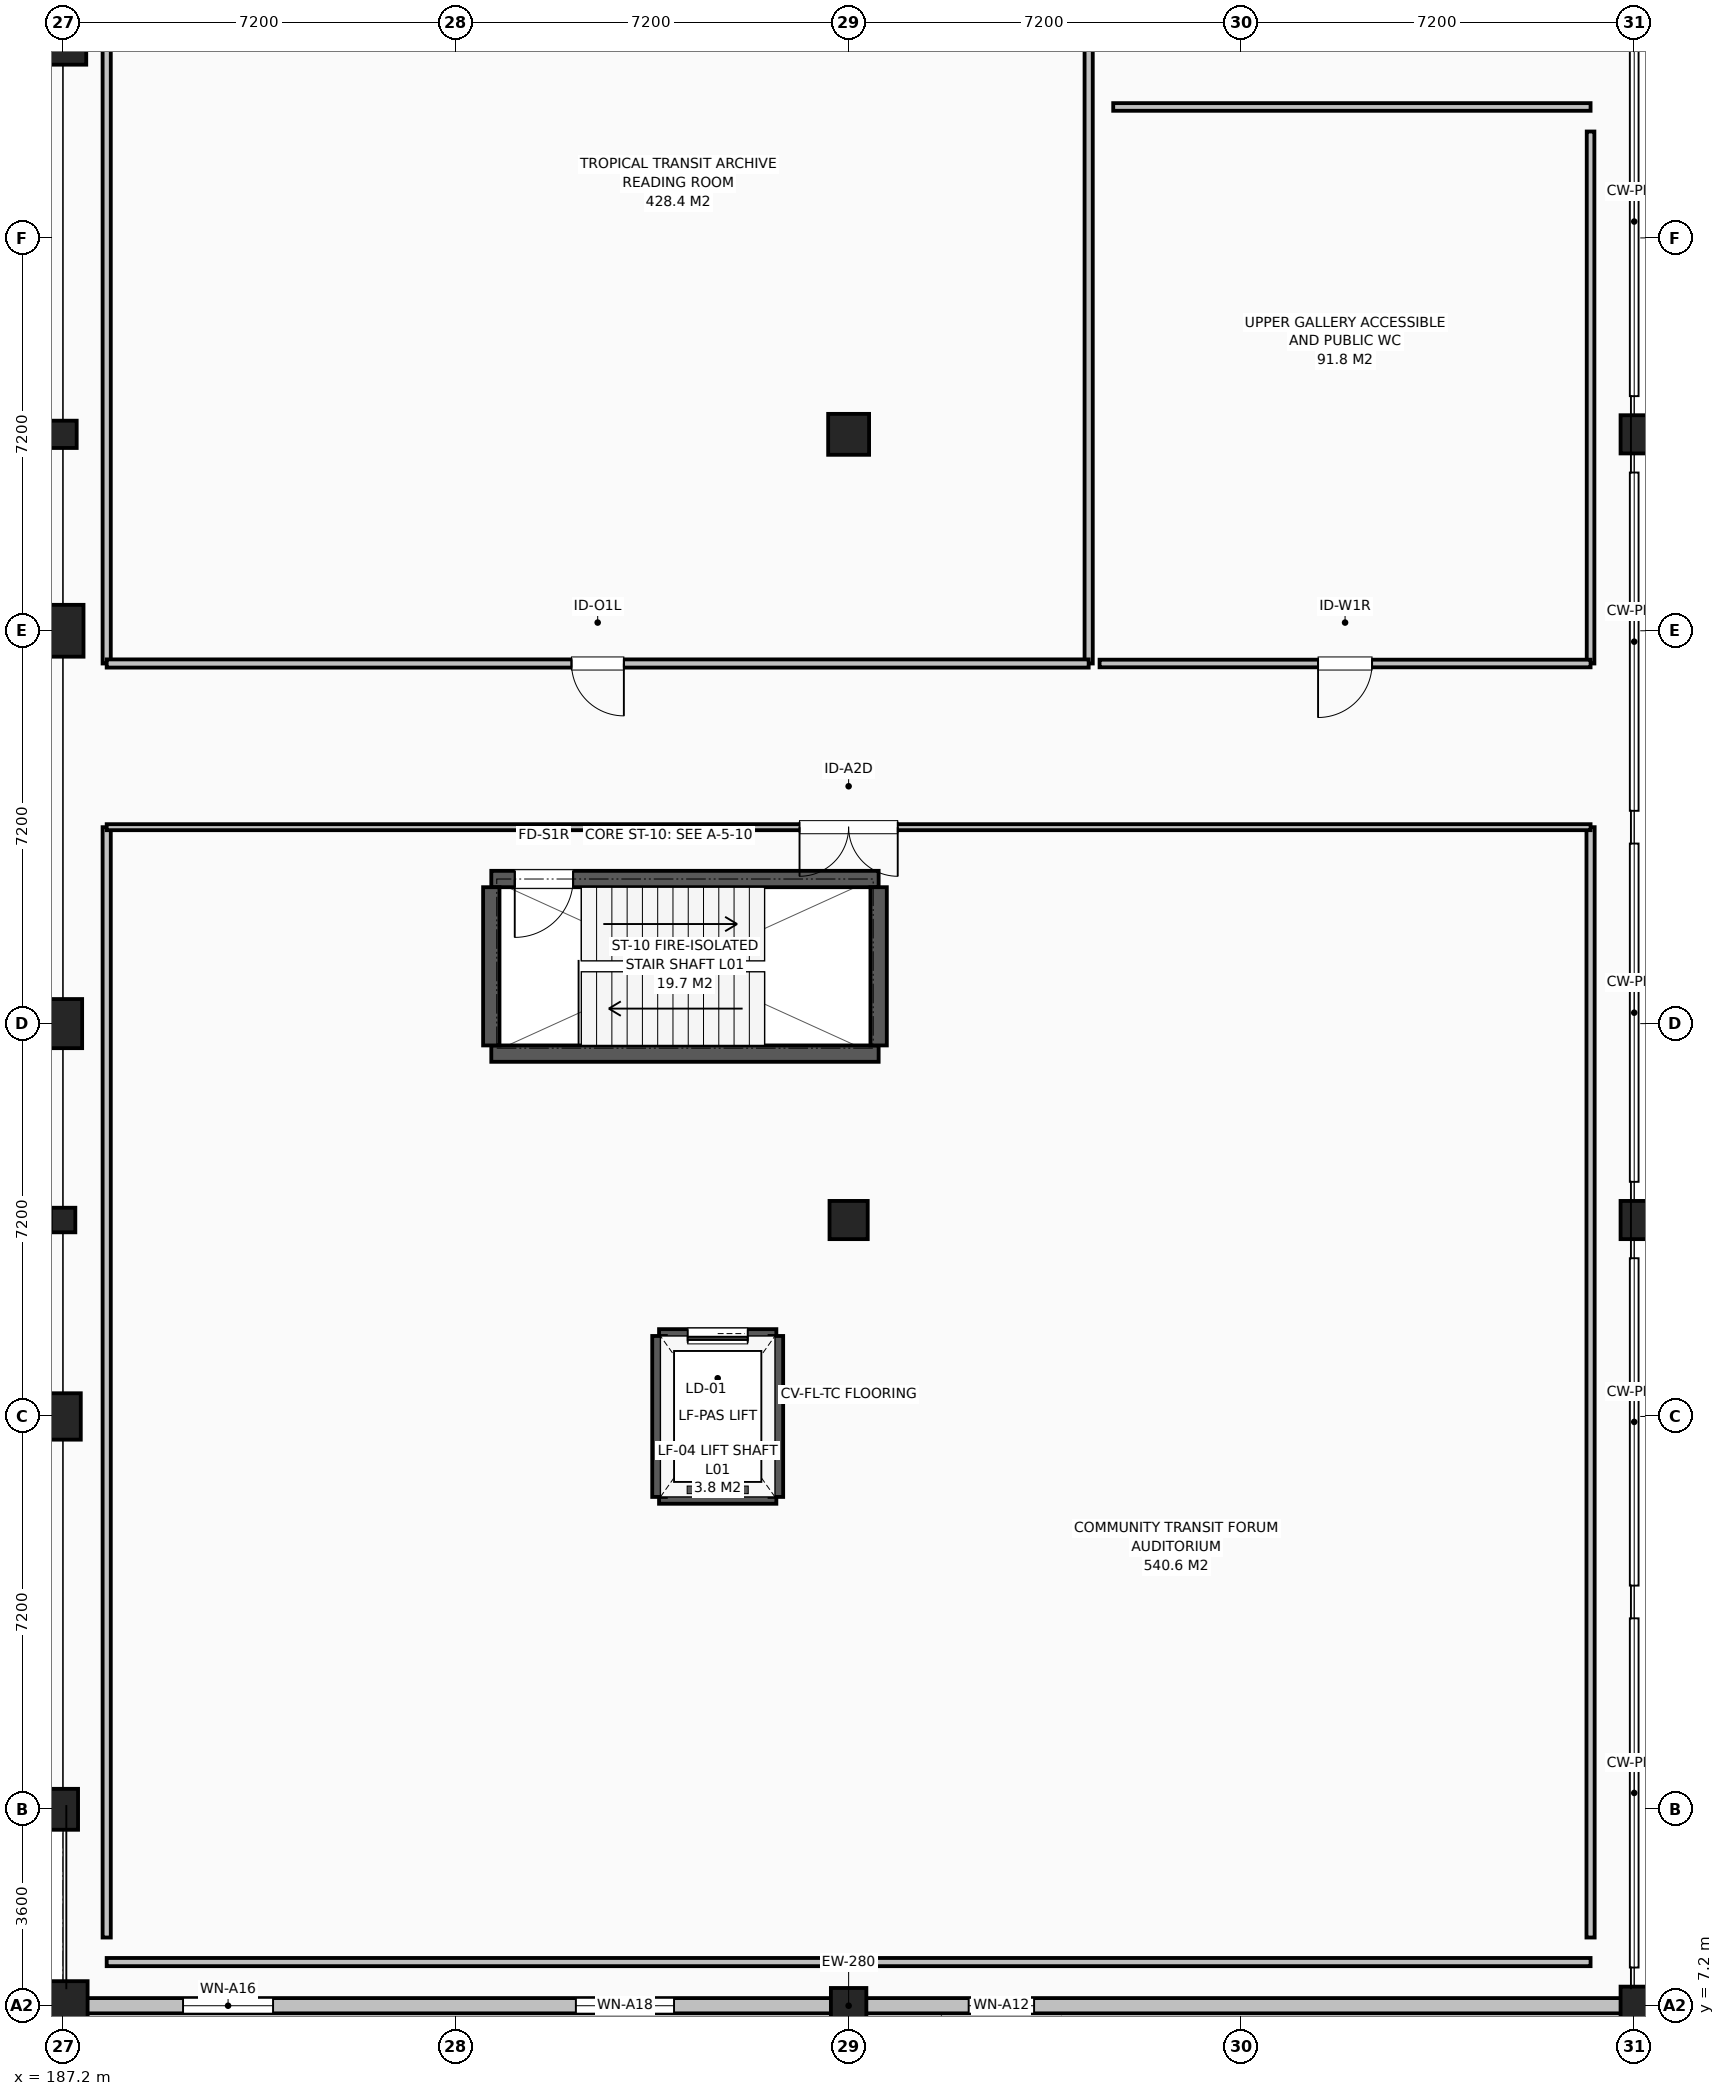
"""IFC4 building model, lengths in metres.
Left out: names, types, materials, properties, quantities, classifications, styles, units other than length and angle.
Written with IfcOpenShell. Run it as: python <this file> out.ifc"""

import sys

from ifc_helpers import new_model, si_unit, direction, frame, frame_2d, origin, origin_2d, place, context, subcontext, project, spatial, rectangle, circle, extrude, element, fill, save


model = new_model("IFC4")
c1 = context("Model", 3, precision=1e-05, world=origin(), true_north=direction((0.0, 1.0)))
c2 = subcontext(c1, "Body", "Model", "MODEL_VIEW")
j1 = project(units=[si_unit("LENGTHUNIT", "METRE"), si_unit("PLANEANGLEUNIT", "RADIAN")], contexts=[c1])
p1 = place(None, origin())
s1 = spatial("IfcSite", under=j1, at=p1, CompositionType="ELEMENT")
p2 = place(p1, origin())
s2 = spatial("IfcBuilding", under=s1, at=p2, CompositionType="ELEMENT")
p3 = place(p2, frame((0.0, 0.0, 4.8)))
s3 = spatial("IfcBuildingStorey", under=s2, at=p3, CompositionType="ELEMENT", Elevation=4.8)
p4 = place(p3, frame((187.2, 7.2, 0.0), z_axis=(0.0, 0.0, 1.0), x_axis=(1.0, 0.0, 0.0)))
e1 = element("IfcColumn", 1, at=p4, inside=s3, PredefinedType="COLUMN", context=c2, shape_type="SweptSolid", body=[
    extrude(circle(Radius=0.45, at=origin_2d()), origin(), (0.0, 0.0, 1.0), 4.2),
])
p5 = place(p3, frame((187.2, 10.8, 0.0), z_axis=(0.0, 0.0, 1.0), x_axis=(1.0, 0.0, 0.0)))
e2 = element("IfcColumn", 2, at=p5, inside=s3, PredefinedType="COLUMN", context=c2, shape_type="SweptSolid", body=[
    extrude(rectangle(XDim=0.55, YDim=0.75, at=origin_2d()), origin(), (0.0, 0.0, 1.0), 4.2),
])
p6 = place(p3, frame((187.2, 18.0, 0.0), z_axis=(0.0, 0.0, 1.0), x_axis=(1.0, 0.0, 0.0)))
e3 = element("IfcColumn", 3, at=p6, inside=s3, PredefinedType="COLUMN", context=c2, shape_type="SweptSolid", body=[
    extrude(rectangle(XDim=0.65, YDim=0.85, at=origin_2d()), origin(), (0.0, 0.0, 1.0), 4.2),
])
p7 = place(p3, frame((187.2, 21.6, 0.0), z_axis=(0.0, 0.0, 1.0), x_axis=(1.0, 0.0, 0.0)))
e4 = element("IfcColumn", 4, at=p7, inside=s3, PredefinedType="COLUMN", context=c2, shape_type="SweptSolid", body=[
    extrude(rectangle(XDim=0.45, YDim=0.45, at=origin_2d()), origin(), (0.0, 0.0, 1.0), 4.2),
])
p8 = place(p3, frame((187.2, 25.2, 0.0), z_axis=(0.0, 0.0, 1.0), x_axis=(1.0, 0.0, 0.0)))
e5 = element("IfcColumn", 5, at=p8, inside=s3, PredefinedType="COLUMN", context=c2, shape_type="SweptSolid", body=[
    extrude(rectangle(XDim=0.7, YDim=0.9, at=origin_2d()), origin(), (0.0, 0.0, 1.0), 4.2),
])
p9 = place(p3, frame((187.2, 32.4, 0.0), z_axis=(0.0, 0.0, 1.0), x_axis=(1.0, 0.0, 0.0)))
e6 = element("IfcColumn", 6, at=p9, inside=s3, PredefinedType="COLUMN", context=c2, shape_type="SweptSolid", body=[
    extrude(rectangle(XDim=0.75, YDim=0.95, at=origin_2d()), origin(), (0.0, 0.0, 1.0), 4.2),
])
p10 = place(p3, frame((187.2, 36.0, 0.0), z_axis=(0.0, 0.0, 1.0), x_axis=(1.0, 0.0, 0.0)))
e7 = element("IfcColumn", 7, at=p10, inside=s3, PredefinedType="COLUMN", context=c2, shape_type="SweptSolid", body=[
    extrude(rectangle(XDim=0.5, YDim=0.5, at=origin_2d()), origin(), (0.0, 0.0, 1.0), 4.2),
])
p11 = place(p3, frame((187.2, 43.2, 0.0), z_axis=(0.0, 0.0, 1.0), x_axis=(1.0, 0.0, 0.0)))
e8 = element("IfcColumn", 8, at=p11, inside=s3, PredefinedType="COLUMN", context=c2, shape_type="SweptSolid", body=[
    extrude(rectangle(XDim=0.85, YDim=0.85, at=origin_2d()), origin(), (0.0, 0.0, 1.0), 4.2),
])
p12 = place(p3, frame((201.6, 7.2, 0.0), z_axis=(0.0, 0.0, 1.0), x_axis=(1.0, 0.0, 0.0)))
e9 = element("IfcColumn", 9, at=p12, inside=s3, PredefinedType="COLUMN", context=c2, shape_type="SweptSolid", body=[
    extrude(rectangle(XDim=0.65, YDim=0.65, at=origin_2d()), origin(), (0.0, 0.0, 1.0), 4.2),
])
p13 = place(p3, frame((201.6, 21.6, 0.0), z_axis=(0.0, 0.0, 1.0), x_axis=(1.0, 0.0, 0.0)))
e10 = element("IfcColumn", 10, at=p13, inside=s3, PredefinedType="COLUMN", context=c2, shape_type="SweptSolid", body=[
    extrude(rectangle(XDim=0.7, YDim=0.7, at=origin_2d()), origin(), (0.0, 0.0, 1.0), 4.2),
])
p14 = place(p3, frame((201.6, 36.0, 0.0), z_axis=(0.0, 0.0, 1.0), x_axis=(1.0, 0.0, 0.0)))
e11 = element("IfcColumn", 11, at=p14, inside=s3, PredefinedType="COLUMN", context=c2, shape_type="SweptSolid", body=[
    extrude(rectangle(XDim=0.75, YDim=0.75, at=origin_2d()), origin(), (0.0, 0.0, 1.0), 4.2),
])
for number, where, z_axis, x_axis in (
    (12, (216.0, 7.2, 0.0), (0.0, 0.0, 1.0), (1.0, 0.0, 0.0)),
    (13, (216.0, 21.6, 0.0), (0.0, 0.0, 1.0), (1.0, 0.0, 0.0)),
    (14, (216.0, 36.0, 0.0), (0.0, 0.0, 1.0), (1.0, 0.0, 0.0)),
):
    element("IfcColumn", number, at=place(p3, frame(where, z_axis=z_axis, x_axis=x_axis)), inside=s3, PredefinedType="COLUMN", context=c2, shape_type="SweptSolid", body=[
        extrude(rectangle(XDim=0.5, YDim=0.7, at=origin_2d()), origin(), (0.0, 0.0, 1.0), 4.2),
    ])
p15 = place(p3, frame((108.0, 10.8, 0.0), z_axis=(0.0, 0.0, 1.0), x_axis=(1.0, 0.0, 0.0)))
e15 = element("IfcWall", 15, at=p15, inside=s3, PredefinedType="SOLIDWALL", context=c2, shape_type="SweptSolid", body=[
    extrude(rectangle(XDim=79.2, YDim=0.3, at=frame_2d((39.6, 0.0))), origin(), (0.0, 0.0, 1.0), 2.872),
])
p16 = place(p3, frame((187.2, 7.2, 0.0), z_axis=(0.0, 0.0, 1.0), x_axis=(1.0, 0.0, 0.0)))
e16 = element("IfcWall", 16, at=p16, inside=s3, PredefinedType="SOLIDWALL", context=c2, shape_type="SweptSolid", body=[
    extrude(rectangle(XDim=28.8, YDim=0.28, at=frame_2d((14.4, 0.0))), origin(), (0.0, 0.0, 1.0), 3.058),
])
p17 = place(p16, frame((2.2, 0.0, 0.72)))
e17 = element("IfcOpeningElement", 17, at=p17, cuts=e16, PredefinedType="OPENING", context=c2, shape_type="SweptSolid", body=[
    extrude(rectangle(XDim=1.65, YDim=2.1, at=frame_2d((0.825, 1.05))), frame((0.0, 0.15, 0.0), z_axis=(0.0, -1.0, 0.0), x_axis=(1.0, 0.0, 0.0)), (0.0, 0.0, 1.0), 0.3),
])
p18 = place(p16, frame((9.4, 0.0, 0.72)))
e18 = element("IfcOpeningElement", 18, at=p18, cuts=e16, PredefinedType="OPENING", context=c2, shape_type="SweptSolid", body=[
    extrude(rectangle(XDim=1.8, YDim=2.15, at=frame_2d((0.9, 1.075))), frame((0.0, 0.15, 0.0), z_axis=(0.0, -1.0, 0.0), x_axis=(1.0, 0.0, 0.0)), (0.0, 0.0, 1.0), 0.3),
])
p19 = place(p16, frame((16.6, 0.0, 0.72)))
e19 = element("IfcOpeningElement", 19, at=p19, cuts=e16, PredefinedType="OPENING", context=c2, shape_type="SweptSolid", body=[
    extrude(rectangle(XDim=1.2, YDim=2.0, at=frame_2d((0.6, 1.0))), frame((0.0, 0.15, 0.0), z_axis=(0.0, -1.0, 0.0), x_axis=(1.0, 0.0, 0.0)), (0.0, 0.0, 1.0), 0.3),
])
p20 = place(p3, frame((195.05, 24.65, 0.0), z_axis=(0.0, 0.0, 1.0), x_axis=(1.0, 0.0, 0.0)))
e20 = element("IfcWall", 20, at=p20, inside=s3, PredefinedType="SHEAR", context=c2, shape_type="SweptSolid", body=[
    extrude(rectangle(XDim=7.1, YDim=0.3, at=frame_2d((3.55, 0.0))), origin(), (0.0, 0.0, 1.0), 3.45),
])
p21 = place(p3, frame((202.15, 27.85, 0.0), z_axis=(0.0, 0.0, 1.0), x_axis=(-1.0, 0.0, 0.0)))
e21 = element("IfcWall", 21, at=p21, inside=s3, PredefinedType="SHEAR", context=c2, shape_type="SweptSolid", body=[
    extrude(rectangle(XDim=7.1, YDim=0.3, at=frame_2d((3.55, 0.0))), origin(), (0.0, 0.0, 1.0), 3.45),
])
p22 = place(p21, frame((5.6, 0.0, 0.0)))
e22 = element("IfcOpeningElement", 22, at=p22, cuts=e21, PredefinedType="OPENING", context=c2, shape_type="SweptSolid", body=[
    extrude(rectangle(XDim=1.07, YDim=2.15, at=frame_2d((0.535, 1.075))), frame((0.0, 0.16, 0.0), z_axis=(0.0, -1.0, 0.0), x_axis=(1.0, 0.0, 0.0)), (0.0, 0.0, 1.0), 0.32),
])
for number, where, z_axis, x_axis in (
    (23, (202.15, 24.8, 0.0), (0.0, 0.0, 1.0), (0.0, 1.0, 0.0)),
    (24, (195.05, 27.7, 0.0), (0.0, 0.0, 1.0), (0.0, -1.0, 0.0)),
):
    element("IfcWall", number, at=place(p3, frame(where, z_axis=z_axis, x_axis=x_axis)), inside=s3, PredefinedType="SHEAR", context=c2, shape_type="SweptSolid", body=[
        extrude(rectangle(XDim=2.9, YDim=0.3, at=frame_2d((1.45, 0.0))), origin(), (0.0, 0.0, 1.0), 3.45),
    ])
p23 = place(p3, frame((198.125, 16.525, 0.0), z_axis=(0.0, 0.0, 1.0), x_axis=(1.0, 0.0, 0.0)))
e25 = element("IfcWall", 25, at=p23, inside=s3, PredefinedType="SHEAR", context=c2, shape_type="SweptSolid", body=[
    extrude(rectangle(XDim=2.15, YDim=0.25, at=frame_2d((1.075, 0.0))), origin(), (0.0, 0.0, 1.0), 3.55),
])
p24 = place(p3, frame((200.275, 19.475, 0.0), z_axis=(0.0, 0.0, 1.0), x_axis=(-1.0, 0.0, 0.0)))
e26 = element("IfcWall", 26, at=p24, inside=s3, PredefinedType="SHEAR", context=c2, shape_type="SweptSolid", body=[
    extrude(rectangle(XDim=2.15, YDim=0.25, at=frame_2d((1.075, 0.0))), origin(), (0.0, 0.0, 1.0), 3.55),
])
p25 = place(p24, frame((0.525, 0.0, 0.0)))
e27 = element("IfcOpeningElement", 27, at=p25, cuts=e26, PredefinedType="OPENING", context=c2, shape_type="SweptSolid", body=[
    extrude(rectangle(XDim=1.1, YDim=2.15, at=frame_2d((0.55, 1.075))), frame((0.0, 0.135, 0.0), z_axis=(0.0, -1.0, 0.0), x_axis=(1.0, 0.0, 0.0)), (0.0, 0.0, 1.0), 0.27),
])
for number, where, z_axis, x_axis in (
    (28, (198.125, 19.475, 0.0), (0.0, 0.0, 1.0), (0.0, -1.0, 0.0)),
    (29, (200.275, 16.525, 0.0), (0.0, 0.0, 1.0), (0.0, 1.0, 0.0)),
):
    element("IfcWall", number, at=place(p3, frame(where, z_axis=z_axis, x_axis=x_axis)), inside=s3, PredefinedType="SHEAR", context=c2, shape_type="SweptSolid", body=[
        extrude(rectangle(XDim=2.95, YDim=0.25, at=frame_2d((1.475, 0.0))), origin(), (0.0, 0.0, 1.0), 3.55),
    ])
p26 = place(p3, frame((215.2, 8.0, 0.0), z_axis=(0.0, 0.0, 1.0), x_axis=(-1.0, 0.0, 0.0)))
e30 = element("IfcWall", 30, at=p26, inside=s3, PredefinedType="PARTITIONING", context=c2, shape_type="SweptSolid", body=[
    extrude(rectangle(XDim=27.2, YDim=0.15, at=frame_2d((13.6, 0.0))), origin(), (0.0, 0.0, 1.0), 3.6),
])
for number, where, z_axis, x_axis in (
    (31, (215.2, 8.45, 0.0), (0.0, 0.0, 1.0), (0.0, 1.0, 0.0)),
    (32, (188.0, 28.8, 0.0), (0.0, 0.0, 1.0), (0.0, -1.0, 0.0)),
):
    element("IfcWall", number, at=place(p3, frame(where, z_axis=z_axis, x_axis=x_axis)), inside=s3, PredefinedType="PARTITIONING", context=c2, shape_type="SweptSolid", body=[
        extrude(rectangle(XDim=20.35, YDim=0.15, at=frame_2d((10.175, 0.0))), origin(), (0.0, 0.0, 1.0), 2.979),
    ])
p27 = place(p3, frame((188.0, 28.8, 0.0), z_axis=(0.0, 0.0, 1.0), x_axis=(1.0, 0.0, 0.0)))
e33 = element("IfcWall", 33, at=p27, inside=s3, PredefinedType="PARTITIONING", context=c2, shape_type="SweptSolid", body=[
    extrude(rectangle(XDim=27.2, YDim=0.11, at=frame_2d((13.6, 0.0))), origin(), (0.0, 0.0, 1.0), 3.6),
])
p28 = place(p27, frame((12.7, 0.0, 0.0)))
e34 = element("IfcOpeningElement", 34, at=p28, cuts=e33, PredefinedType="OPENING", context=c2, shape_type="SweptSolid", body=[
    extrude(rectangle(XDim=1.8, YDim=2.2, at=frame_2d((0.9, 1.1))), frame((0.0, 0.065, 0.0), z_axis=(0.0, -1.0, 0.0), x_axis=(1.0, 0.0, 0.0)), (0.0, 0.0, 1.0), 0.13),
])
for number, where, z_axis, x_axis in (
    (35, (206.0, 31.8, 0.0), (0.0, 0.0, 1.0), (0.0, 1.0, 0.0)),
    (36, (188.0, 55.15, 0.0), (0.0, 0.0, 1.0), (0.0, -1.0, 0.0)),
):
    element("IfcWall", number, at=place(p3, frame(where, z_axis=z_axis, x_axis=x_axis)), inside=s3, PredefinedType="PARTITIONING", context=c2, shape_type="SweptSolid", body=[
        extrude(rectangle(XDim=23.35, YDim=0.15, at=frame_2d((11.675, 0.0))), origin(), (0.0, 0.0, 1.0), 3.284),
    ])
p29 = place(p3, frame((206.0, 31.8, 0.0), z_axis=(0.0, 0.0, 1.0), x_axis=(-1.0, 0.0, 0.0)))
e37 = element("IfcWall", 37, at=p29, inside=s3, PredefinedType="PARTITIONING", context=c2, shape_type="SweptSolid", body=[
    extrude(rectangle(XDim=18.0, YDim=0.15, at=frame_2d((9.0, 0.0))), origin(), (0.0, 0.0, 1.0), 3.6),
])
p30 = place(p29, frame((8.52, 0.0, 0.0)))
e38 = element("IfcOpeningElement", 38, at=p30, cuts=e37, PredefinedType="OPENING", context=c2, shape_type="SweptSolid", body=[
    extrude(rectangle(XDim=0.96, YDim=2.15, at=frame_2d((0.48, 1.075))), frame((0.0, 0.085, 0.0), z_axis=(0.0, -1.0, 0.0), x_axis=(1.0, 0.0, 0.0)), (0.0, 0.0, 1.0), 0.17),
])
p31 = place(p3, frame((206.45, 42.0, 0.0), z_axis=(0.0, 0.0, 1.0), x_axis=(1.0, 0.0, 0.0)))
e39 = element("IfcWall", 39, at=p31, inside=s3, PredefinedType="PARTITIONING", context=c2, shape_type="SweptSolid", body=[
    extrude(rectangle(XDim=8.75, YDim=0.14, at=frame_2d((4.375, 0.0))), origin(), (0.0, 0.0, 1.0), 3.5),
])
p32 = place(p3, frame((215.2, 31.8, 0.0), z_axis=(0.0, 0.0, 1.0), x_axis=(0.0, 1.0, 0.0)))
e40 = element("IfcWall", 40, at=p32, inside=s3, PredefinedType="PARTITIONING", context=c2, shape_type="SweptSolid", body=[
    extrude(rectangle(XDim=9.75, YDim=0.14, at=frame_2d((4.875, 0.0))), origin(), (0.0, 0.0, 1.0), 3.287),
])
p33 = place(p3, frame((215.2, 31.8, 0.0), z_axis=(0.0, 0.0, 1.0), x_axis=(-1.0, 0.0, 0.0)))
e41 = element("IfcWall", 41, at=p33, inside=s3, PredefinedType="PARTITIONING", context=c2, shape_type="SweptSolid", body=[
    extrude(rectangle(XDim=9.0, YDim=0.14, at=frame_2d((4.5, 0.0))), origin(), (0.0, 0.0, 1.0), 3.5),
])
p34 = place(p33, frame((4.005, 0.0, 0.0)))
e42 = element("IfcOpeningElement", 42, at=p34, cuts=e41, PredefinedType="OPENING", context=c2, shape_type="SweptSolid", body=[
    extrude(rectangle(XDim=0.99, YDim=2.15, at=frame_2d((0.495, 1.075))), frame((0.0, 0.08, 0.0), z_axis=(0.0, -1.0, 0.0), x_axis=(1.0, 0.0, 0.0)), (0.0, 0.0, 1.0), 0.16),
])
p35 = place(p17, origin())
e43 = element("IfcWindow", 43, at=p35, inside=s3, PartitioningType="SINGLE_PANEL", PredefinedType="WINDOW", context=c2, shape_type="SweptSolid", body=[
    extrude(rectangle(XDim=1.65, YDim=2.1, at=frame_2d((0.825, 1.05))), frame((0.0, 0.03, 0.0), z_axis=(0.0, -1.0, 0.0), x_axis=(1.0, 0.0, 0.0)), (0.0, 0.0, 1.0), 0.06),
])
fill(e17, e43)
p36 = place(p18, origin())
e44 = element("IfcWindow", 44, at=p36, inside=s3, PartitioningType="SINGLE_PANEL", PredefinedType="WINDOW", context=c2, shape_type="SweptSolid", body=[
    extrude(rectangle(XDim=1.8, YDim=2.15, at=frame_2d((0.9, 1.075))), frame((0.0, 0.03, 0.0), z_axis=(0.0, -1.0, 0.0), x_axis=(1.0, 0.0, 0.0)), (0.0, 0.0, 1.0), 0.06),
])
fill(e18, e44)
p37 = place(p19, origin())
e45 = element("IfcWindow", 45, at=p37, inside=s3, PartitioningType="SINGLE_PANEL", PredefinedType="WINDOW", context=c2, shape_type="SweptSolid", body=[
    extrude(rectangle(XDim=1.2, YDim=2.0, at=frame_2d((0.6, 1.0))), frame((0.0, 0.03, 0.0), z_axis=(0.0, -1.0, 0.0), x_axis=(1.0, 0.0, 0.0)), (0.0, 0.0, 1.0), 0.06),
])
fill(e19, e45)
p38 = place(p22, origin())
e46 = element("IfcDoor", 46, at=p38, inside=s3, OperationType="SINGLE_SWING_RIGHT", PredefinedType="DOOR", context=c2, shape_type="SweptSolid", body=[
    extrude(rectangle(XDim=1.07, YDim=2.15, at=frame_2d((0.535, 1.075))), frame((0.0, 0.025, 0.0), z_axis=(0.0, -1.0, 0.0), x_axis=(1.0, 0.0, 0.0)), (0.0, 0.0, 1.0), 0.05),
])
fill(e22, e46)
p39 = place(p25, origin())
e47 = element("IfcDoor", 47, at=p39, inside=s3, OperationType="SLIDING_TO_LEFT", PredefinedType="DOOR", context=c2, shape_type="SweptSolid", body=[
    extrude(rectangle(XDim=1.1, YDim=2.15, at=frame_2d((0.55, 1.075))), frame((0.0, 0.025, 0.0), z_axis=(0.0, -1.0, 0.0), x_axis=(1.0, 0.0, 0.0)), (0.0, 0.0, 1.0), 0.05),
])
fill(e27, e47)
p40 = place(p28, origin())
e48 = element("IfcDoor", 48, at=p40, inside=s3, OperationType="DOUBLE_SWING_RIGHT", PredefinedType="DOOR", context=c2, shape_type="SweptSolid", body=[
    extrude(rectangle(XDim=1.8, YDim=2.2, at=frame_2d((0.9, 1.1))), frame((0.0, 0.025, 0.0), z_axis=(0.0, -1.0, 0.0), x_axis=(1.0, 0.0, 0.0)), (0.0, 0.0, 1.0), 0.05),
])
fill(e34, e48)
p41 = place(p30, origin())
e49 = element("IfcDoor", 49, at=p41, inside=s3, OperationType="SINGLE_SWING_LEFT", PredefinedType="DOOR", context=c2, shape_type="SweptSolid", body=[
    extrude(rectangle(XDim=0.96, YDim=2.15, at=frame_2d((0.48, 1.075))), frame((0.0, 0.025, 0.0), z_axis=(0.0, -1.0, 0.0), x_axis=(1.0, 0.0, 0.0)), (0.0, 0.0, 1.0), 0.05),
])
fill(e38, e49)
p42 = place(p34, origin())
e50 = element("IfcDoor", 50, at=p42, inside=s3, OperationType="SINGLE_SWING_RIGHT", PredefinedType="DOOR", context=c2, shape_type="SweptSolid", body=[
    extrude(rectangle(XDim=0.99, YDim=2.15, at=frame_2d((0.495, 1.075))), frame((0.0, 0.025, 0.0), z_axis=(0.0, -1.0, 0.0), x_axis=(1.0, 0.0, 0.0)), (0.0, 0.0, 1.0), 0.05),
])
fill(e42, e50)
save(model, sys.argv[1])
